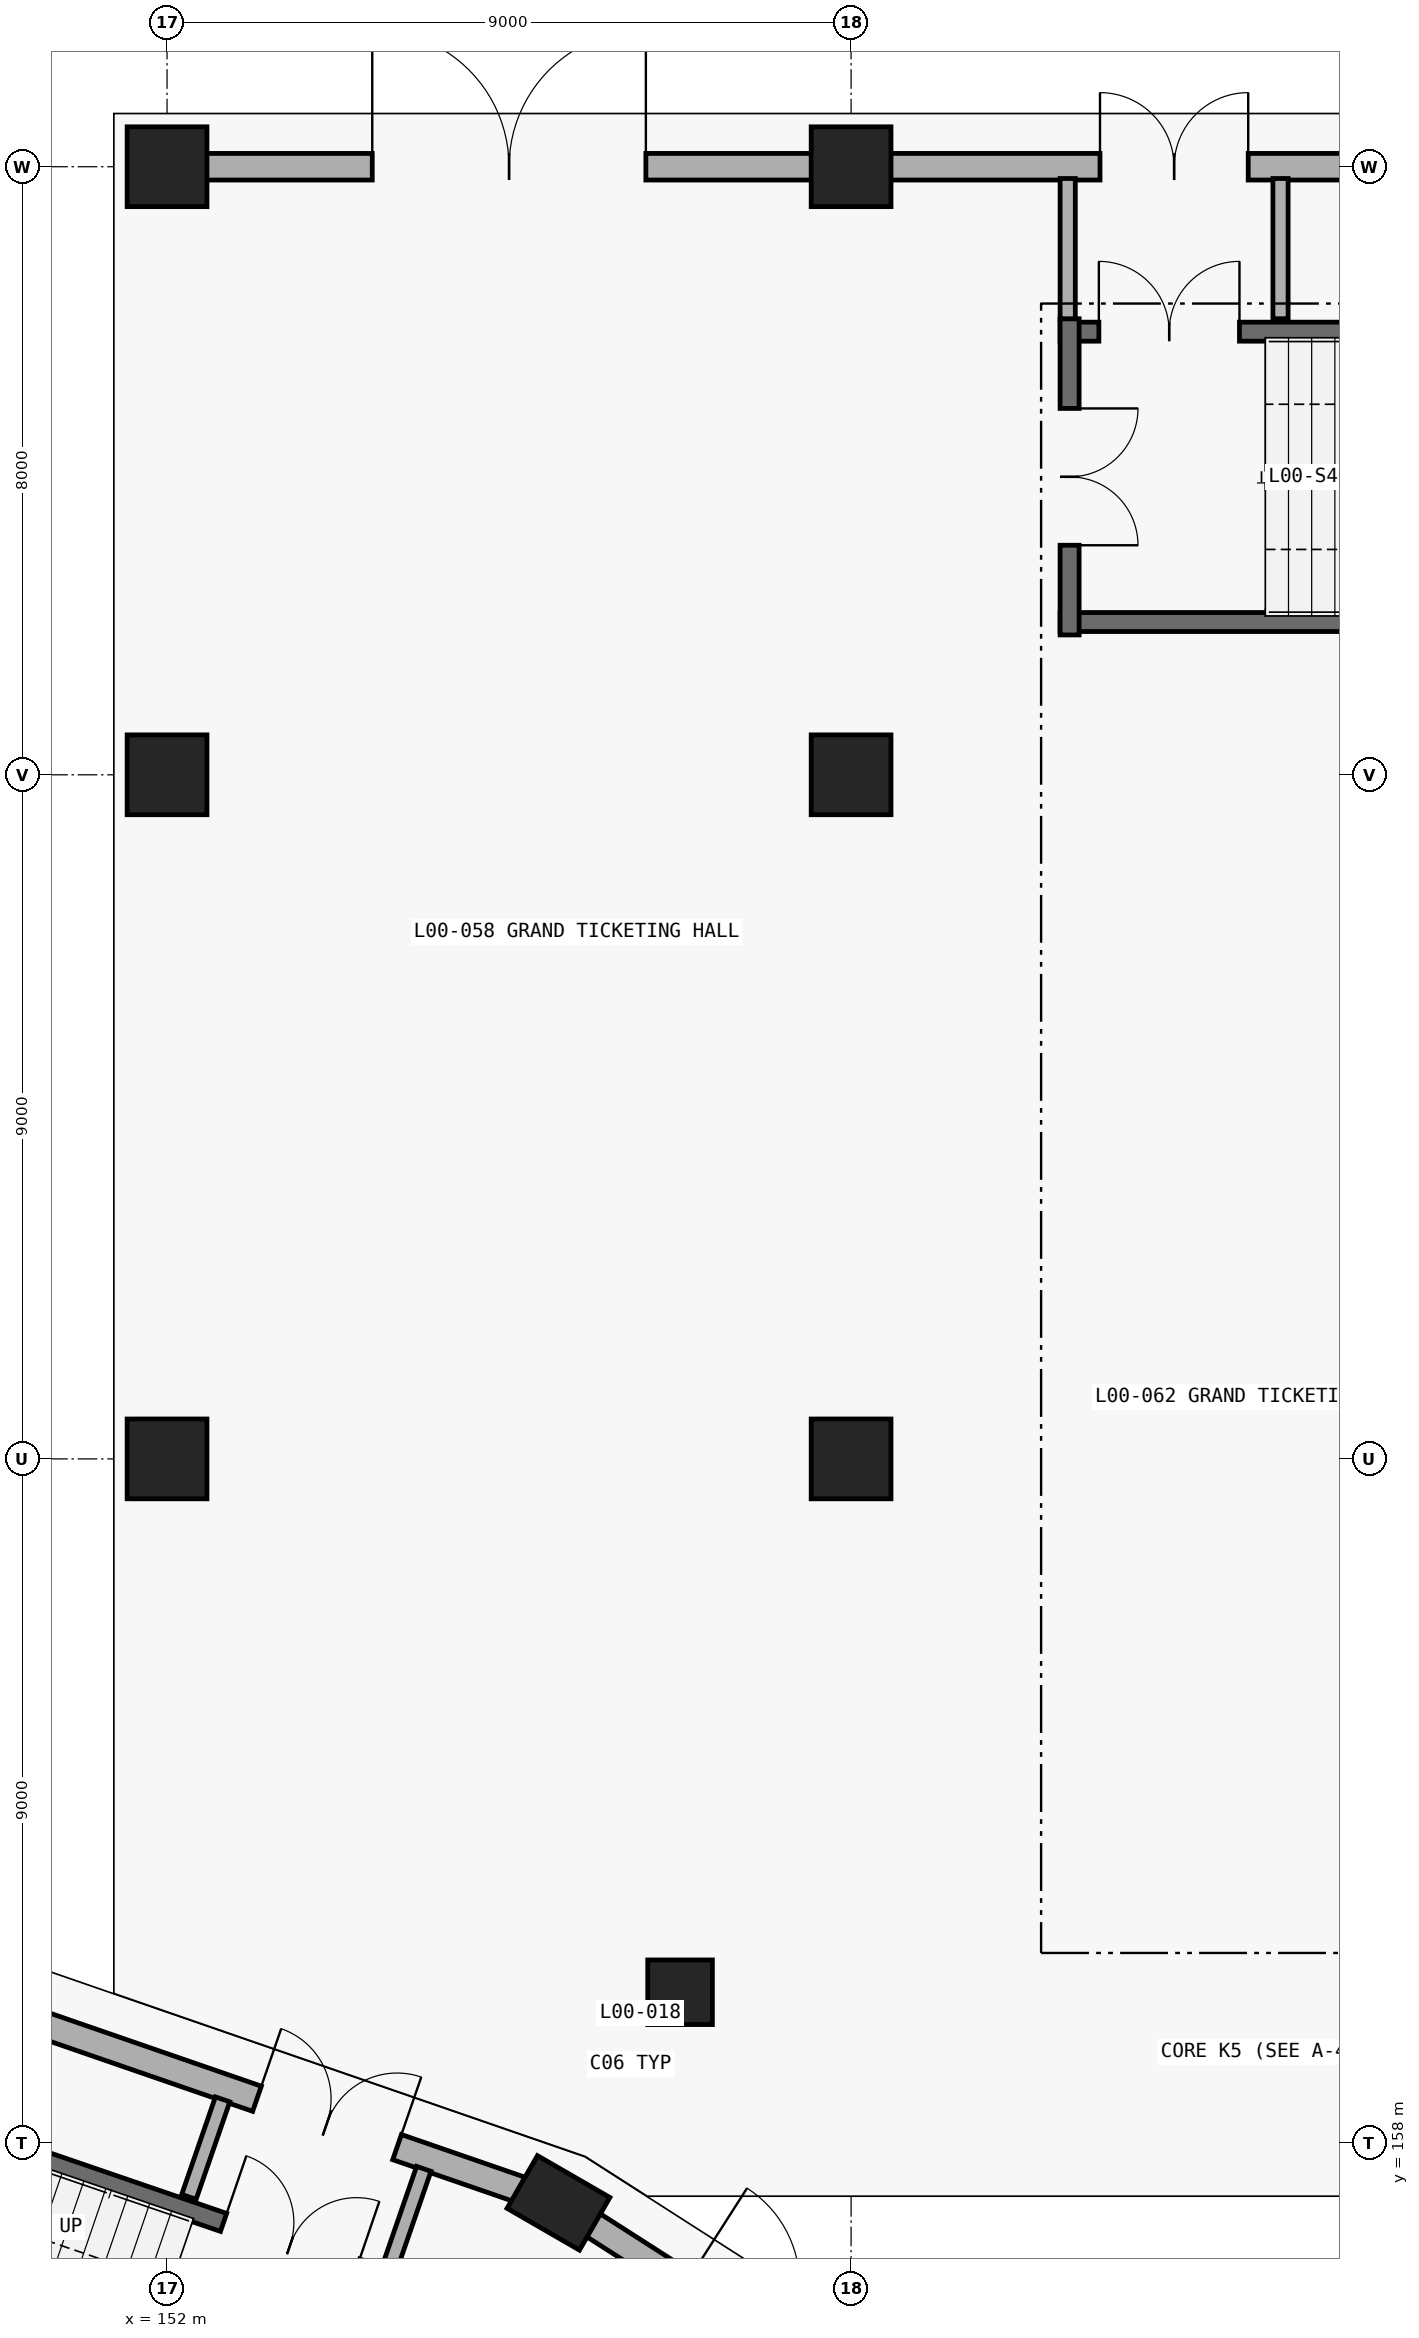
"""IFC4 building model, lengths in metres.
Left out: names, types, materials, properties, quantities, classifications, styles, units other than length and angle.
Written with IfcOpenShell. Run it as: python <this file> out.ifc"""

import sys

from ifc_helpers import new_model, si_unit, direction, frame, frame_2d, origin, origin_2d, place, context, subcontext, project, spatial, rectangle, circle, extrude, element, fill, save


model = new_model("IFC4")
c1 = context("Model", 3, precision=1e-05, world=origin(), true_north=direction((0.0, 1.0)))
c2 = subcontext(c1, "Body", "Model", "MODEL_VIEW")
j1 = project(units=[si_unit("LENGTHUNIT", "METRE"), si_unit("PLANEANGLEUNIT", "RADIAN")], contexts=[c1])
p1 = place(None, origin())
s1 = spatial("IfcSite", under=j1, at=p1, CompositionType="ELEMENT")
p2 = place(p1, origin())
s2 = spatial("IfcBuilding", under=s1, at=p2, CompositionType="ELEMENT")
p3 = place(p2, origin())
s3 = spatial("IfcBuildingStorey", under=s2, at=p3, CompositionType="ELEMENT", Elevation=0.0)
p4 = place(p3, frame((157.15, 157.212, 0.0), z_axis=(0.0, 0.0, 1.0), x_axis=(0.5, 0.866025403784, 0.0)))
e1 = element("IfcColumn", 1, at=p4, inside=s3, PredefinedType="COLUMN", context=c2, shape_type="SweptSolid", body=[
    extrude(rectangle(XDim=0.8, YDim=1.1, at=origin_2d()), origin(), (0.0, 0.0, 1.0), 5.4),
])
p5 = place(p3, frame((158.75, 159.983, 0.0), z_axis=(0.0, 0.0, 1.0), x_axis=(1.0, 0.0, 0.0)))
e2 = element("IfcColumn", 2, at=p5, inside=s3, PredefinedType="COLUMN", context=c2, shape_type="SweptSolid", body=[
    extrude(circle(Radius=0.425, at=origin_2d()), origin(), (0.0, 0.0, 1.0), 5.4),
])
for number, where, z_axis, x_axis in (
    (3, (152.0, 167.0, 0.0), (0.0, 0.0, 1.0), (1.0, 0.0, 0.0)),
    (4, (152.0, 176.0, 0.0), (0.0, 0.0, 1.0), (1.0, 0.0, 0.0)),
    (5, (152.0, 184.0, 0.0), (0.0, 0.0, 1.0), (1.0, 0.0, 0.0)),
    (6, (161.0, 167.0, 0.0), (0.0, 0.0, 1.0), (1.0, 0.0, 0.0)),
    (7, (161.0, 176.0, 0.0), (0.0, 0.0, 1.0), (1.0, 0.0, 0.0)),
    (8, (161.0, 184.0, 0.0), (0.0, 0.0, 1.0), (1.0, 0.0, 0.0)),
):
    element("IfcColumn", number, at=place(p3, frame(where, z_axis=z_axis, x_axis=x_axis)), inside=s3, PredefinedType="COLUMN", context=c2, shape_type="SweptSolid", body=[
        extrude(rectangle(XDim=1.05, YDim=1.05, at=origin_2d()), origin(), (0.0, 0.0, 1.0), 5.4),
    ])
p6 = place(p3, frame((157.593, 156.929, 0.0), z_axis=(0.0, 0.0, 1.0), x_axis=(0.842308733224, -0.538995359845, 0.0)))
e9 = element("IfcWall", 9, at=p6, inside=s3, PredefinedType="STANDARD", context=c2, shape_type="SweptSolid", body=[
    extrude(rectangle(XDim=21.139, YDim=0.35, at=frame_2d((10.57, 0.0))), origin(), (0.0, 0.0, 1.0), 4.165),
])
p7 = place(p6, frame((12.556, 0.0, 0.0)))
e10 = element("IfcOpeningElement", 10, at=p7, cuts=e9, PredefinedType="OPENING", context=c2, shape_type="SweptSolid", body=[
    extrude(rectangle(XDim=1.95, YDim=2.25, at=frame_2d((0.975, 1.125))), frame((0.0, 0.185, 0.0), z_axis=(0.0, -1.0, 0.0), x_axis=(1.0, 0.0, 0.0)), (0.0, 0.0, 1.0), 0.37),
])
p8 = place(p6, frame((1.46, 0.0, 0.0)))
e11 = element("IfcOpeningElement", 11, at=p8, cuts=e9, PredefinedType="OPENING", context=c2, shape_type="SweptSolid", body=[
    extrude(rectangle(XDim=3.0, YDim=2.55, at=frame_2d((1.5, 1.275))), frame((0.0, 0.185, 0.0), z_axis=(0.0, -1.0, 0.0), x_axis=(1.0, 0.0, 0.0)), (0.0, 0.0, 1.0), 0.37),
])
p9 = place(p3, frame((135.869, 164.562, 0.0), z_axis=(0.0, 0.0, 1.0), x_axis=(0.945215757663, -0.326446276538, 0.0)))
e12 = element("IfcWall", 12, at=p9, inside=s3, PredefinedType="STANDARD", context=c2, shape_type="SweptSolid", body=[
    extrude(rectangle(XDim=21.979, YDim=0.35, at=frame_2d((10.99, 0.0))), origin(), (0.0, 0.0, 1.0), 4.165),
])
p10 = place(p9, frame((18.318, 0.0, 0.0)))
e13 = element("IfcOpeningElement", 13, at=p10, cuts=e12, PredefinedType="OPENING", context=c2, shape_type="SweptSolid", body=[
    extrude(rectangle(XDim=1.95, YDim=2.25, at=frame_2d((0.975, 1.125))), frame((0.0, 0.185, 0.0), z_axis=(0.0, -1.0, 0.0), x_axis=(1.0, 0.0, 0.0)), (0.0, 0.0, 1.0), 0.37),
])
p11 = place(p9, frame((7.818, 0.0, 0.0)))
e14 = element("IfcOpeningElement", 14, at=p11, cuts=e12, PredefinedType="OPENING", context=c2, shape_type="SweptSolid", body=[
    extrude(rectangle(XDim=1.95, YDim=2.25, at=frame_2d((0.975, 1.125))), frame((0.0, 0.185, 0.0), z_axis=(0.0, -1.0, 0.0), x_axis=(1.0, 0.0, 0.0)), (0.0, 0.0, 1.0), 0.37),
])
p12 = place(p9, frame((4.3, 0.0, 0.0)))
e15 = element("IfcOpeningElement", 15, at=p12, cuts=e12, PredefinedType="OPENING", context=c2, shape_type="SweptSolid", body=[
    extrude(rectangle(XDim=1.95, YDim=2.25, at=frame_2d((0.975, 1.125))), frame((0.0, 0.185, 0.0), z_axis=(0.0, -1.0, 0.0), x_axis=(1.0, 0.0, 0.0)), (0.0, 0.0, 1.0), 0.37),
])
p13 = place(p3, frame((152.5, 184.0, 0.0), z_axis=(0.0, 0.0, 1.0), x_axis=(1.0, 0.0, 0.0)))
e16 = element("IfcWall", 16, at=p13, inside=s3, PredefinedType="STANDARD", context=c2, shape_type="SweptSolid", body=[
    extrude(rectangle(XDim=8.0, YDim=0.35, at=frame_2d((4.0, 0.0))), origin(), (0.0, 0.0, 1.0), 4.384),
])
p14 = place(p13, frame((2.2, 0.0, 0.0)))
e17 = element("IfcOpeningElement", 17, at=p14, cuts=e16, PredefinedType="OPENING", context=c2, shape_type="SweptSolid", body=[
    extrude(rectangle(XDim=3.6, YDim=2.7, at=frame_2d((1.8, 1.35))), frame((0.0, 0.185, 0.0), z_axis=(0.0, -1.0, 0.0), x_axis=(1.0, 0.0, 0.0)), (0.0, 0.0, 1.0), 0.37),
])
p15 = place(p3, frame((161.5, 184.0, 0.0), z_axis=(0.0, 0.0, 1.0), x_axis=(1.0, 0.0, 0.0)))
e18 = element("IfcWall", 18, at=p15, inside=s3, PredefinedType="STANDARD", context=c2, shape_type="SweptSolid", body=[
    extrude(rectangle(XDim=8.0, YDim=0.35, at=frame_2d((4.0, 0.0))), origin(), (0.0, 0.0, 1.0), 4.384),
])
p16 = place(p15, frame((2.775, 0.0, 0.0)))
e19 = element("IfcOpeningElement", 19, at=p16, cuts=e18, PredefinedType="OPENING", context=c2, shape_type="SweptSolid", body=[
    extrude(rectangle(XDim=1.95, YDim=2.25, at=frame_2d((0.975, 1.125))), frame((0.0, 0.185, 0.0), z_axis=(0.0, -1.0, 0.0), x_axis=(1.0, 0.0, 0.0)), (0.0, 0.0, 1.0), 0.37),
])
p17 = place(p3, frame((145.941, 159.285, 0.0), z_axis=(0.0, 0.0, 1.0), x_axis=(0.946064424228, -0.323978556712, 0.0)))
e20 = element("IfcWall", 20, at=p17, inside=s3, PredefinedType="SHEAR", context=c2, shape_type="SweptSolid", body=[
    extrude(rectangle(XDim=9.55, YDim=0.25, at=frame_2d((4.775, 0.0))), origin(), (0.0, 0.0, 1.0), 5.1),
])
p18 = place(p17, frame((7.19, 0.0, 0.0)))
e21 = element("IfcOpeningElement", 21, at=p18, cuts=e20, PredefinedType="OPENING", context=c2, shape_type="SweptSolid", body=[
    extrude(rectangle(XDim=1.85, YDim=2.3, at=frame_2d((0.925, 1.15))), frame((0.0, 0.135, 0.0), z_axis=(0.0, -1.0, 0.0), x_axis=(1.0, 0.0, 0.0)), (0.0, 0.0, 1.0), 0.27),
])
p19 = place(p3, frame((163.75, 178.01, 0.0), z_axis=(0.0, 0.0, 1.0), x_axis=(1.0, 0.0, 0.0)))
e22 = element("IfcWall", 22, at=p19, inside=s3, PredefinedType="SHEAR", context=c2, shape_type="SweptSolid", body=[
    extrude(rectangle(XDim=9.5, YDim=0.25, at=frame_2d((4.75, 0.0))), origin(), (0.0, 0.0, 1.0), 5.1),
])
p20 = place(p3, frame((163.75, 181.83, 0.0), z_axis=(0.0, 0.0, 1.0), x_axis=(1.0, 0.0, 0.0)))
e23 = element("IfcWall", 23, at=p20, inside=s3, PredefinedType="SHEAR", context=c2, shape_type="SweptSolid", body=[
    extrude(rectangle(XDim=9.5, YDim=0.25, at=frame_2d((4.75, 0.0))), origin(), (0.0, 0.0, 1.0), 5.1),
])
p21 = place(p20, frame((0.51, 0.0, 0.0)))
e24 = element("IfcOpeningElement", 24, at=p21, cuts=e23, PredefinedType="OPENING", context=c2, shape_type="SweptSolid", body=[
    extrude(rectangle(XDim=1.85, YDim=2.3, at=frame_2d((0.925, 1.15))), frame((0.0, 0.135, 0.0), z_axis=(0.0, -1.0, 0.0), x_axis=(1.0, 0.0, 0.0)), (0.0, 0.0, 1.0), 0.27),
])
p22 = place(p3, frame((163.875, 182.0, 0.0), z_axis=(0.0, 0.0, 1.0), x_axis=(0.0, -1.0, 0.0)))
e25 = element("IfcWall", 25, at=p22, inside=s3, PredefinedType="SHEAR", context=c2, shape_type="SweptSolid", body=[
    extrude(rectangle(XDim=4.16, YDim=0.25, at=frame_2d((2.08, 0.0))), origin(), (0.0, 0.0, 1.0), 5.1),
])
p23 = place(p22, frame((1.18, 0.0, 0.0)))
e26 = element("IfcOpeningElement", 26, at=p23, cuts=e25, PredefinedType="OPENING", context=c2, shape_type="SweptSolid", body=[
    extrude(rectangle(XDim=1.8, YDim=2.25, at=frame_2d((0.9, 1.125))), frame((0.0, 0.135, 0.0), z_axis=(0.0, -1.0, 0.0), x_axis=(1.0, 0.0, 0.0)), (0.0, 0.0, 1.0), 0.27),
])
p24 = place(p3, frame((154.937, 156.384, 0.0), z_axis=(0.0, 0.0, 1.0), x_axis=(0.326626008273, 0.945153665136, 0.0)))
e27 = element("IfcWall", 27, at=p24, inside=s3, PredefinedType="PARTITIONING", context=c2, shape_type="SweptSolid", body=[
    extrude(rectangle(XDim=1.35, YDim=0.2, at=frame_2d((0.675, 0.0))), origin(), (0.0, 0.0, 1.0), 4.165),
])
p25 = place(p3, frame((152.288, 157.291, 0.0), z_axis=(0.0, 0.0, 1.0), x_axis=(0.326461818728, 0.945210389761, 0.0)))
e28 = element("IfcWall", 28, at=p25, inside=s3, PredefinedType="PARTITIONING", context=c2, shape_type="SweptSolid", body=[
    extrude(rectangle(XDim=1.357, YDim=0.2, at=frame_2d((0.679, 0.0))), origin(), (0.0, 0.0, 1.0), 4.165),
])
for number, where, z_axis, x_axis in (
    (29, (163.85, 182.0, 0.0), (0.0, 0.0, 1.0), (0.0, 1.0, 0.0)),
    (30, (166.65, 182.0, 0.0), (0.0, 0.0, 1.0), (0.0, 1.0, 0.0)),
):
    element("IfcWall", number, at=place(p3, frame(where, z_axis=z_axis, x_axis=x_axis)), inside=s3, PredefinedType="PARTITIONING", context=c2, shape_type="SweptSolid", body=[
        extrude(rectangle(XDim=1.845, YDim=0.2, at=frame_2d((0.922, 0.0))), origin(), (0.0, 0.0, 1.0), 4.384),
    ])
p26 = place(p10, origin())
e31 = element("IfcDoor", 31, at=p26, inside=s3, OperationType="DOUBLE_DOOR_SINGLE_SWING", PredefinedType="DOOR", context=c2, shape_type="SweptSolid", body=[
    extrude(rectangle(XDim=1.95, YDim=2.25, at=frame_2d((0.975, 1.125))), frame((0.0, 0.025, 0.0), z_axis=(0.0, -1.0, 0.0), x_axis=(1.0, 0.0, 0.0)), (0.0, 0.0, 1.0), 0.05),
])
fill(e13, e31)
p27 = place(p14, origin())
e32 = element("IfcDoor", 32, at=p27, inside=s3, OperationType="DOUBLE_DOOR_SINGLE_SWING", PredefinedType="DOOR", context=c2, shape_type="SweptSolid", body=[
    extrude(rectangle(XDim=3.6, YDim=2.7, at=frame_2d((1.8, 1.35))), frame((0.0, 0.025, 0.0), z_axis=(0.0, -1.0, 0.0), x_axis=(1.0, 0.0, 0.0)), (0.0, 0.0, 1.0), 0.05),
])
fill(e17, e32)
p28 = place(p16, origin())
e33 = element("IfcDoor", 33, at=p28, inside=s3, OperationType="DOUBLE_DOOR_SINGLE_SWING", PredefinedType="DOOR", context=c2, shape_type="SweptSolid", body=[
    extrude(rectangle(XDim=1.95, YDim=2.25, at=frame_2d((0.975, 1.125))), frame((0.0, 0.025, 0.0), z_axis=(0.0, -1.0, 0.0), x_axis=(1.0, 0.0, 0.0)), (0.0, 0.0, 1.0), 0.05),
])
fill(e19, e33)
p29 = place(p18, origin())
e34 = element("IfcDoor", 34, at=p29, inside=s3, OperationType="DOUBLE_DOOR_SINGLE_SWING", PredefinedType="DOOR", context=c2, shape_type="SweptSolid", body=[
    extrude(rectangle(XDim=1.85, YDim=2.3, at=frame_2d((0.925, 1.15))), frame((0.0, 0.025, 0.0), z_axis=(0.0, -1.0, 0.0), x_axis=(1.0, 0.0, 0.0)), (0.0, 0.0, 1.0), 0.05),
])
fill(e21, e34)
p30 = place(p23, origin())
e35 = element("IfcDoor", 35, at=p30, inside=s3, OperationType="DOUBLE_DOOR_SINGLE_SWING", PredefinedType="DOOR", context=c2, shape_type="SweptSolid", body=[
    extrude(rectangle(XDim=1.8, YDim=2.25, at=frame_2d((0.9, 1.125))), frame((0.0, 0.025, 0.0), z_axis=(0.0, -1.0, 0.0), x_axis=(1.0, 0.0, 0.0)), (0.0, 0.0, 1.0), 0.05),
])
fill(e26, e35)
p31 = place(p21, origin())
e36 = element("IfcDoor", 36, at=p31, inside=s3, OperationType="DOUBLE_DOOR_SINGLE_SWING", PredefinedType="DOOR", context=c2, shape_type="SweptSolid", body=[
    extrude(rectangle(XDim=1.85, YDim=2.3, at=frame_2d((0.925, 1.15))), frame((0.0, 0.025, 0.0), z_axis=(0.0, -1.0, 0.0), x_axis=(1.0, 0.0, 0.0)), (0.0, 0.0, 1.0), 0.05),
])
fill(e24, e36)
save(model, sys.argv[1])
